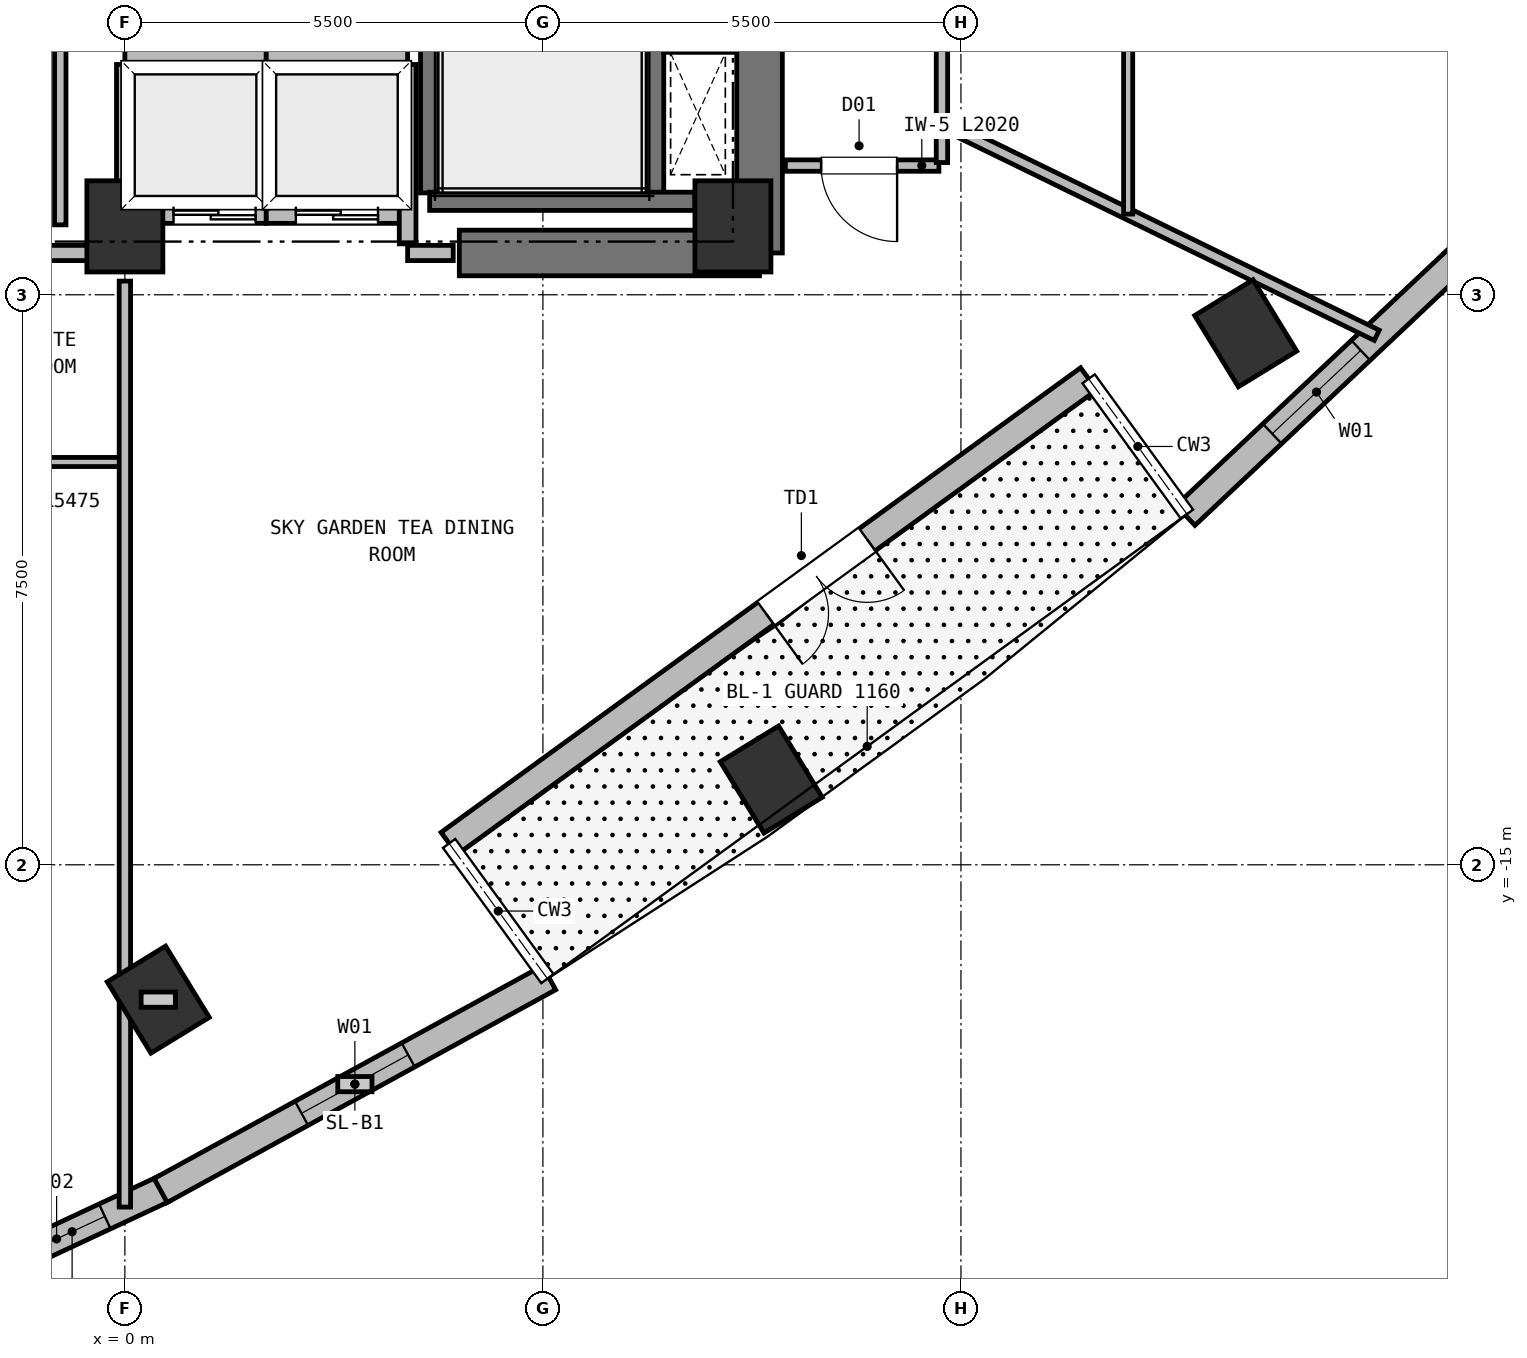
"""IFC4 building model, lengths in metres.
Left out: names, types, materials, properties, quantities, classifications, styles, units other than length and angle.
Written with IfcOpenShell. Run it as: python <this file> out.ifc"""

import sys

from ifc_helpers import new_model, si_unit, direction, frame, frame_2d, origin, origin_2d, place, context, subcontext, project, spatial, rectangle, extrude, element, fill, save


model = new_model("IFC4")
c1 = context("Model", 3, precision=1e-05, world=origin(), true_north=direction((0.0, 1.0)))
c2 = subcontext(c1, "Body", "Model", "MODEL_VIEW")
j1 = project(units=[si_unit("LENGTHUNIT", "METRE"), si_unit("PLANEANGLEUNIT", "RADIAN")], contexts=[c1])
p1 = place(None, origin())
s1 = spatial("IfcSite", under=j1, at=p1, CompositionType="ELEMENT")
p2 = place(p1, origin())
s2 = spatial("IfcBuilding", under=s1, at=p2, CompositionType="ELEMENT")
p3 = place(p2, frame((0.0, 0.0, 142.25)))
s3 = spatial("IfcBuildingStorey", under=s2, at=p3, CompositionType="ELEMENT", Elevation=142.25)
for number, where, z_axis, x_axis in (
    (1, (0.0, -6.6, 0.0), (0.0, 0.0, 1.0), (1.0, 0.0, 0.0)),
    (2, (8.0, -6.6, 0.0), (0.0, 0.0, 1.0), (1.0, 0.0, 0.0)),
):
    element("IfcColumn", number, at=place(p3, frame(where, z_axis=z_axis, x_axis=x_axis)), inside=s3, PredefinedType="COLUMN", context=c2, shape_type="SweptSolid", body=[
        extrude(rectangle(XDim=1.0, YDim=1.2, at=origin_2d()), origin(), (0.0, 0.0, 1.0), 3.75),
    ])
p4 = place(p3, frame((4.4, -6.95, 0.0), z_axis=(0.0, 0.0, 1.0), x_axis=(1.0, 0.0, 0.0)))
e3 = element("IfcWall", 3, at=p4, inside=s3, PredefinedType="SHEAR", context=c2, shape_type="SweptSolid", body=[
    extrude(rectangle(XDim=3.95, YDim=0.6, at=frame_2d((1.975, 0.0))), origin(), (0.0, 0.0, 1.0), 3.5),
])
p5 = place(p3, frame((8.35, -6.95, 0.0), z_axis=(0.0, 0.0, 1.0), x_axis=(0.0, 1.0, 0.0)))
e4 = element("IfcWall", 4, at=p5, inside=s3, PredefinedType="SHEAR", context=c2, shape_type="SweptSolid", body=[
    extrude(rectangle(XDim=8.1, YDim=0.6, at=frame_2d((4.05, 0.0))), origin(), (0.0, 0.0, 1.0), 3.5),
])
for number, where, z_axis, x_axis in (
    (5, (0.439, -16.774, 0.0), (0.0, 0.0, 1.0), (0.853, 0.522, 0.0)),
    (6, (8.504, -13.878, 0.0), (0.0, 0.0, 1.0), (0.853, 0.522, 0.0)),
    (7, (14.747, -8.007, 0.0), (0.0, 0.0, 1.0), (0.853, 0.522, 0.0)),
):
    element("IfcColumn", number, at=place(p3, frame(where, z_axis=z_axis, x_axis=x_axis)), inside=s3, PredefinedType="COLUMN", context=c2, shape_type="SweptSolid", body=[
        extrude(rectangle(XDim=0.9, YDim=1.1, at=origin_2d()), origin(), (0.0, 0.0, 1.0), 3.75),
    ])
p6 = place(p3, frame((12.68, -8.606, 0.0), z_axis=(0.0, 0.0, 1.0), x_axis=(-0.809015154073, -0.587787785243, 0.0)))
e8 = element("IfcWall", 8, at=p6, inside=s3, PredefinedType="SOLIDWALL", context=c2, shape_type="SweptSolid", body=[
    extrude(rectangle(XDim=10.4, YDim=0.36, at=frame_2d((5.2, 0.0))), origin(), (0.0, 0.0, 1.0), 3.15),
])
p7 = place(p6, frame((3.6, 0.0, 0.0)))
e9 = element("IfcOpeningElement", 9, at=p7, cuts=e8, PredefinedType="OPENING", context=c2, shape_type="SweptSolid", body=[
    extrude(rectangle(XDim=1.65, YDim=2.25, at=frame_2d((0.825, 1.125))), frame((0.0, 0.19, 0.0), z_axis=(0.0, -1.0, 0.0), x_axis=(1.0, 0.0, 0.0)), (0.0, 0.0, 1.0), 0.38),
])
p8 = place(p3, frame((0.515, -19.263, 0.0), z_axis=(0.0, 0.0, 1.0), x_axis=(-0.906085000499, -0.423095700606, 0.0)))
e10 = element("IfcWall", 10, at=p8, inside=s3, PredefinedType="SOLIDWALL", context=c2, shape_type="SweptSolid", body=[
    extrude(rectangle(XDim=2.67, YDim=0.36, at=frame_2d((1.335, 0.0))), origin(), (0.0, 0.0, 1.0), 3.5),
])
p9 = place(p8, frame((0.86, 0.0, 0.72)))
e11 = element("IfcOpeningElement", 11, at=p9, cuts=e10, PredefinedType="OPENING", context=c2, shape_type="SweptSolid", body=[
    extrude(rectangle(XDim=1.4, YDim=1.84, at=frame_2d((0.7, 0.92))), frame((0.0, 0.19, 0.0), z_axis=(0.0, -1.0, 0.0), x_axis=(1.0, 0.0, 0.0)), (0.0, 0.0, 1.0), 0.38),
])
p10 = place(p3, frame((5.581, -16.487, 0.0), z_axis=(0.0, 0.0, 1.0), x_axis=(-0.877084079585, -0.480336879012, 0.0)))
e12 = element("IfcWall", 12, at=p10, inside=s3, PredefinedType="SOLIDWALL", context=c2, shape_type="SweptSolid", body=[
    extrude(rectangle(XDim=5.827, YDim=0.36, at=frame_2d((2.914, 0.0))), origin(), (0.0, 0.0, 1.0), 3.5),
])
p11 = place(p10, frame((2.113, 0.0, 0.72)))
e13 = element("IfcOpeningElement", 13, at=p11, cuts=e12, PredefinedType="OPENING", context=c2, shape_type="SweptSolid", body=[
    extrude(rectangle(XDim=1.6, YDim=1.88, at=frame_2d((0.8, 0.94))), frame((0.0, 0.19, 0.0), z_axis=(0.0, -1.0, 0.0), x_axis=(1.0, 0.0, 0.0)), (0.0, 0.0, 1.0), 0.38),
])
p12 = place(p3, frame((18.196, -6.407, 0.0), z_axis=(0.0, 0.0, 1.0), x_axis=(-0.727867791097, -0.685717491889, 0.0)))
e14 = element("IfcWall", 14, at=p12, inside=s3, PredefinedType="SOLIDWALL", context=c2, shape_type="SweptSolid", body=[
    extrude(rectangle(XDim=5.827, YDim=0.36, at=frame_2d((2.914, 0.0))), origin(), (0.0, 0.0, 1.0), 3.5),
])
p13 = place(p12, frame((2.66, 0.0, 0.72)))
e15 = element("IfcOpeningElement", 15, at=p13, cuts=e14, PredefinedType="OPENING", context=c2, shape_type="SweptSolid", body=[
    extrude(rectangle(XDim=1.6, YDim=1.88, at=frame_2d((0.8, 0.94))), frame((0.0, 0.19, 0.0), z_axis=(0.0, -1.0, 0.0), x_axis=(1.0, 0.0, 0.0)), (0.0, 0.0, 1.0), 0.38),
])
for number, where, z_axis, x_axis in (
    (16, (4.01, -6.16, 0.0), (0.0, 0.0, 1.0), (0.0, 1.0, 0.0)),
    (17, (6.97, -6.16, 0.0), (0.0, 0.0, 1.0), (0.0, 1.0, 0.0)),
):
    element("IfcWall", number, at=place(p3, frame(where, z_axis=z_axis, x_axis=x_axis)), inside=s3, PredefinedType="SHEAR", context=c2, shape_type="SweptSolid", body=[
        extrude(rectangle(XDim=7.22, YDim=0.24, at=frame_2d((3.61, 0.0))), origin(), (0.0, 0.0, 1.0), 3.5),
    ])
p14 = place(p3, frame((4.01, -6.27, 0.0), z_axis=(0.0, 0.0, 1.0), x_axis=(1.0, 0.0, 0.0)))
e18 = element("IfcWall", 18, at=p14, inside=s3, PredefinedType="SHEAR", context=c2, shape_type="SweptSolid", body=[
    extrude(rectangle(XDim=3.49, YDim=0.24, at=frame_2d((1.745, 0.0))), origin(), (0.0, 0.0, 1.0), 3.5),
])
p15 = place(p3, frame((7.09, -4.2, 0.0), z_axis=(0.0, 0.0, 1.0), x_axis=(1.0, 0.0, 0.0)))
e19 = element("IfcWall", 19, at=p15, inside=s3, PredefinedType="PARTITIONING", context=c2, shape_type="SweptSolid", body=[
    extrude(rectangle(XDim=0.96, YDim=0.22, at=frame_2d((0.48, 0.0))), origin(), (0.0, 0.0, 1.0), 3.5),
])
p16 = place(p3, frame((0.0, -6.45, 0.0), z_axis=(0.0, 0.0, 1.0), x_axis=(1.0, 0.0, 0.0)))
e20 = element("IfcWall", 20, at=p16, inside=s3, PredefinedType="PARTITIONING", context=c2, shape_type="SweptSolid", body=[
    extrude(rectangle(XDim=1.86, YDim=0.22, at=frame_2d((0.93, 0.0))), origin(), (0.0, 0.0, 1.0), 3.12),
])
p17 = place(p16, frame((0.64, 0.0, 0.0)))
e21 = element("IfcOpeningElement", 21, at=p17, cuts=e20, PredefinedType="OPENING", context=c2, shape_type="SweptSolid", body=[
    extrude(rectangle(XDim=1.08, YDim=2.15, at=frame_2d((0.54, 1.075))), frame((0.0, 0.12, 0.0), z_axis=(0.0, -1.0, 0.0), x_axis=(1.0, 0.0, 0.0)), (0.0, 0.0, 1.0), 0.24),
])
for number, where, z_axis, x_axis in (
    (22, (0.0, -4.35, 0.0), (0.0, 0.0, 1.0), (1.0, 0.0, 0.0)),
    (23, (0.0, -6.33, 0.0), (0.0, 0.0, 1.0), (0.0, 1.0, 0.0)),
    (24, (1.86, -6.33, 0.0), (0.0, 0.0, 1.0), (0.0, 1.0, 0.0)),
):
    element("IfcWall", number, at=place(p3, frame(where, z_axis=z_axis, x_axis=x_axis)), inside=s3, PredefinedType="PARTITIONING", context=c2, shape_type="SweptSolid", body=[
        extrude(rectangle(XDim=1.86, YDim=0.22, at=frame_2d((0.93, 0.0))), origin(), (0.0, 0.0, 1.0), 3.5),
    ])
p18 = place(p3, frame((1.86, -6.45, 0.0), z_axis=(0.0, 0.0, 1.0), x_axis=(1.0, 0.0, 0.0)))
e25 = element("IfcWall", 25, at=p18, inside=s3, PredefinedType="PARTITIONING", context=c2, shape_type="SweptSolid", body=[
    extrude(rectangle(XDim=1.86, YDim=0.22, at=frame_2d((0.93, 0.0))), origin(), (0.0, 0.0, 1.0), 3.12),
])
p19 = place(p18, frame((0.39, 0.0, 0.0)))
e26 = element("IfcOpeningElement", 26, at=p19, cuts=e25, PredefinedType="OPENING", context=c2, shape_type="SweptSolid", body=[
    extrude(rectangle(XDim=1.08, YDim=2.15, at=frame_2d((0.54, 1.075))), frame((0.0, 0.12, 0.0), z_axis=(0.0, -1.0, 0.0), x_axis=(1.0, 0.0, 0.0)), (0.0, 0.0, 1.0), 0.24),
])
p20 = place(p3, frame((1.86, -4.35, 0.0), z_axis=(0.0, 0.0, 1.0), x_axis=(1.0, 0.0, 0.0)))
e27 = element("IfcWall", 27, at=p20, inside=s3, PredefinedType="PARTITIONING", context=c2, shape_type="SweptSolid", body=[
    extrude(rectangle(XDim=1.86, YDim=0.22, at=frame_2d((0.93, 0.0))), origin(), (0.0, 0.0, 1.0), 3.5),
])
p21 = place(p3, frame((3.72, -6.83, 0.0), z_axis=(0.0, 0.0, 1.0), x_axis=(0.0, 1.0, 0.0)))
e28 = element("IfcWall", 28, at=p21, inside=s3, PredefinedType="PARTITIONING", context=c2, shape_type="SweptSolid", body=[
    extrude(rectangle(XDim=2.36, YDim=0.22, at=frame_2d((1.18, 0.0))), origin(), (0.0, 0.0, 1.0), 3.5),
])
p22 = place(p3, frame((-4.32, -6.95, 0.0), z_axis=(0.0, 0.0, 1.0), x_axis=(1.0, 0.0, 0.0)))
e29 = element("IfcWall", 29, at=p22, inside=s3, PredefinedType="PARTITIONING", context=c2, shape_type="SweptSolid", body=[
    extrude(rectangle(XDim=4.32, YDim=0.2, at=frame_2d((2.16, 0.0))), origin(), (0.0, 0.0, 1.0), 3.5),
])
p23 = place(p3, frame((3.72, -6.95, 0.0), z_axis=(0.0, 0.0, 1.0), x_axis=(1.0, 0.0, 0.0)))
e30 = element("IfcWall", 30, at=p23, inside=s3, PredefinedType="PARTITIONING", context=c2, shape_type="SweptSolid", body=[
    extrude(rectangle(XDim=0.6, YDim=0.2, at=frame_2d((0.3, 0.0))), origin(), (0.0, 0.0, 1.0), 3.5),
])
p24 = place(p3, frame((-0.85, -6.58, 0.0), z_axis=(0.0, 0.0, 1.0), x_axis=(0.0, 1.0, 0.0)))
e31 = element("IfcWall", 31, at=p24, inside=s3, PredefinedType="PARTITIONING", context=c2, shape_type="SweptSolid", body=[
    extrude(rectangle(XDim=7.53, YDim=0.15, at=frame_2d((3.765, 0.0))), origin(), (0.0, 0.0, 1.0), 3.5),
])
p25 = place(p3, frame((10.71, -5.8, 0.0), z_axis=(0.0, 0.0, 1.0), x_axis=(-1.0, 0.0, 0.0)))
e32 = element("IfcWall", 32, at=p25, inside=s3, PredefinedType="PARTITIONING", context=c2, shape_type="SweptSolid", body=[
    extrude(rectangle(XDim=2.02, YDim=0.15, at=frame_2d((1.01, 0.0))), origin(), (0.0, 0.0, 1.0), 3.5),
])
p26 = place(p25, frame((0.55, 0.0, 0.0)))
e33 = element("IfcOpeningElement", 33, at=p26, cuts=e32, PredefinedType="OPENING", context=c2, shape_type="SweptSolid", body=[
    extrude(rectangle(XDim=1.0, YDim=2.15, at=frame_2d((0.5, 1.075))), frame((0.0, 0.085, 0.0), z_axis=(0.0, -1.0, 0.0), x_axis=(1.0, 0.0, 0.0)), (0.0, 0.0, 1.0), 0.17),
])
p27 = place(p3, frame((10.75, 7.16, 0.0), z_axis=(0.0, 0.0, 1.0), x_axis=(0.0, -1.0, 0.0)))
e34 = element("IfcWall", 34, at=p27, inside=s3, PredefinedType="PARTITIONING", context=c2, shape_type="SweptSolid", body=[
    extrude(rectangle(XDim=12.92, YDim=0.15, at=frame_2d((6.46, 0.0))), origin(), (0.0, 0.0, 1.0), 3.5),
])
p28 = place(p27, frame((1.133, 0.0, 0.0)))
e35 = element("IfcOpeningElement", 35, at=p28, cuts=e34, PredefinedType="OPENING", context=c2, shape_type="SweptSolid", body=[
    extrude(rectangle(XDim=1.0, YDim=2.15, at=frame_2d((0.5, 1.075))), frame((0.0, 0.085, 0.0), z_axis=(0.0, -1.0, 0.0), x_axis=(1.0, 0.0, 0.0)), (0.0, 0.0, 1.0), 0.17),
])
p29 = place(p27, frame((4.989, 0.0, 0.0)))
e36 = element("IfcOpeningElement", 36, at=p29, cuts=e34, PredefinedType="OPENING", context=c2, shape_type="SweptSolid", body=[
    extrude(rectangle(XDim=1.06, YDim=2.15, at=frame_2d((0.53, 1.075))), frame((0.0, 0.085, 0.0), z_axis=(0.0, -1.0, 0.0), x_axis=(1.0, 0.0, 0.0)), (0.0, 0.0, 1.0), 0.17),
])
p30 = place(p3, frame((0.0, -9.7, 0.0), z_axis=(0.0, 0.0, 1.0), x_axis=(-1.0, 0.0, 0.0)))
e37 = element("IfcWall", 37, at=p30, inside=s3, PredefinedType="PARTITIONING", context=c2, shape_type="SweptSolid", body=[
    extrude(rectangle(XDim=5.475, YDim=0.12, at=frame_2d((2.737, 0.0))), origin(), (0.0, 0.0, 1.0), 3.5),
])
p31 = place(p30, frame((2.277, 0.0, 0.0)))
e38 = element("IfcOpeningElement", 38, at=p31, cuts=e37, PredefinedType="OPENING", context=c2, shape_type="SweptSolid", body=[
    extrude(rectangle(XDim=0.92, YDim=2.1, at=frame_2d((0.46, 1.05))), frame((0.0, 0.07, 0.0), z_axis=(0.0, -1.0, 0.0), x_axis=(1.0, 0.0, 0.0)), (0.0, 0.0, 1.0), 0.14),
])
p32 = place(p3, frame((0.0, -7.32, 0.0), z_axis=(0.0, 0.0, 1.0), x_axis=(0.0, -1.0, 0.0)))
e39 = element("IfcWall", 39, at=p32, inside=s3, PredefinedType="PARTITIONING", context=c2, shape_type="SweptSolid", body=[
    extrude(rectangle(XDim=12.184, YDim=0.15, at=frame_2d((6.092, 0.0))), origin(), (0.0, 0.0, 1.0), 3.5),
])
p33 = place(p3, frame((10.75, -5.243, 0.0), z_axis=(0.0, 0.0, 1.0), x_axis=(0.898794987621, -0.438369216787, 0.0)))
e40 = element("IfcWall", 40, at=p33, inside=s3, PredefinedType="PARTITIONING", context=c2, shape_type="SweptSolid", body=[
    extrude(rectangle(XDim=6.365, YDim=0.15, at=frame_2d((3.182, 0.0))), origin(), (0.0, 0.0, 1.0), 3.5),
])
p34 = place(p3, frame((13.2, -0.988, 0.0), z_axis=(0.0, 0.0, 1.0), x_axis=(0.0, -1.0, 0.0)))
e41 = element("IfcWall", 41, at=p34, inside=s3, PredefinedType="PARTITIONING", context=c2, shape_type="SweptSolid", body=[
    extrude(rectangle(XDim=5.45, YDim=0.12, at=frame_2d((2.725, 0.0))), origin(), (0.0, 0.0, 1.0), 3.5),
])
p35 = place(p34, frame((2.265, 0.0, 0.0)))
e42 = element("IfcOpeningElement", 42, at=p35, cuts=e41, PredefinedType="OPENING", context=c2, shape_type="SweptSolid", body=[
    extrude(rectangle(XDim=0.92, YDim=2.1, at=frame_2d((0.46, 1.05))), frame((0.0, 0.07, 0.0), z_axis=(0.0, -1.0, 0.0), x_axis=(1.0, 0.0, 0.0)), (0.0, 0.0, 1.0), 0.14),
])
p36 = place(p7, origin())
e43 = element("IfcDoor", 43, at=p36, inside=s3, OperationType="DOUBLE_DOOR_SINGLE_SWING", PredefinedType="DOOR", context=c2, shape_type="SweptSolid", body=[
    extrude(rectangle(XDim=1.65, YDim=2.25, at=frame_2d((0.825, 1.125))), frame((0.0, 0.025, 0.0), z_axis=(0.0, -1.0, 0.0), x_axis=(1.0, 0.0, 0.0)), (0.0, 0.0, 1.0), 0.05),
])
fill(e9, e43)
p37 = place(p9, origin())
e44 = element("IfcWindow", 44, at=p37, inside=s3, PartitioningType="SINGLE_PANEL", PredefinedType="WINDOW", context=c2, shape_type="SweptSolid", body=[
    extrude(rectangle(XDim=1.4, YDim=1.84, at=frame_2d((0.7, 0.92))), frame((0.0, 0.03, 0.0), z_axis=(0.0, -1.0, 0.0), x_axis=(1.0, 0.0, 0.0)), (0.0, 0.0, 1.0), 0.06),
])
fill(e11, e44)
p38 = place(p11, origin())
e45 = element("IfcWindow", 45, at=p38, inside=s3, PartitioningType="SINGLE_PANEL", PredefinedType="WINDOW", context=c2, shape_type="SweptSolid", body=[
    extrude(rectangle(XDim=1.6, YDim=1.88, at=frame_2d((0.8, 0.94))), frame((0.0, 0.03, 0.0), z_axis=(0.0, -1.0, 0.0), x_axis=(1.0, 0.0, 0.0)), (0.0, 0.0, 1.0), 0.06),
])
fill(e13, e45)
p39 = place(p13, origin())
e46 = element("IfcWindow", 46, at=p39, inside=s3, PartitioningType="SINGLE_PANEL", PredefinedType="WINDOW", context=c2, shape_type="SweptSolid", body=[
    extrude(rectangle(XDim=1.6, YDim=1.88, at=frame_2d((0.8, 0.94))), frame((0.0, 0.03, 0.0), z_axis=(0.0, -1.0, 0.0), x_axis=(1.0, 0.0, 0.0)), (0.0, 0.0, 1.0), 0.06),
])
fill(e15, e46)
p40 = place(p17, origin())
e47 = element("IfcDoor", 47, at=p40, inside=s3, OperationType="DOUBLE_DOOR_SLIDING", PredefinedType="DOOR", context=c2, shape_type="SweptSolid", body=[
    extrude(rectangle(XDim=1.08, YDim=2.15, at=frame_2d((0.54, 1.075))), frame((0.0, 0.025, 0.0), z_axis=(0.0, -1.0, 0.0), x_axis=(1.0, 0.0, 0.0)), (0.0, 0.0, 1.0), 0.05),
])
fill(e21, e47)
p41 = place(p19, origin())
e48 = element("IfcDoor", 48, at=p41, inside=s3, OperationType="DOUBLE_DOOR_SLIDING", PredefinedType="DOOR", context=c2, shape_type="SweptSolid", body=[
    extrude(rectangle(XDim=1.08, YDim=2.15, at=frame_2d((0.54, 1.075))), frame((0.0, 0.025, 0.0), z_axis=(0.0, -1.0, 0.0), x_axis=(1.0, 0.0, 0.0)), (0.0, 0.0, 1.0), 0.05),
])
fill(e26, e48)
p42 = place(p26, origin())
e49 = element("IfcDoor", 49, at=p42, inside=s3, OperationType="SINGLE_SWING_LEFT", PredefinedType="DOOR", context=c2, shape_type="SweptSolid", body=[
    extrude(rectangle(XDim=1.0, YDim=2.15, at=frame_2d((0.5, 1.075))), frame((0.0, 0.025, 0.0), z_axis=(0.0, -1.0, 0.0), x_axis=(1.0, 0.0, 0.0)), (0.0, 0.0, 1.0), 0.05),
])
fill(e33, e49)
save(model, sys.argv[1])
